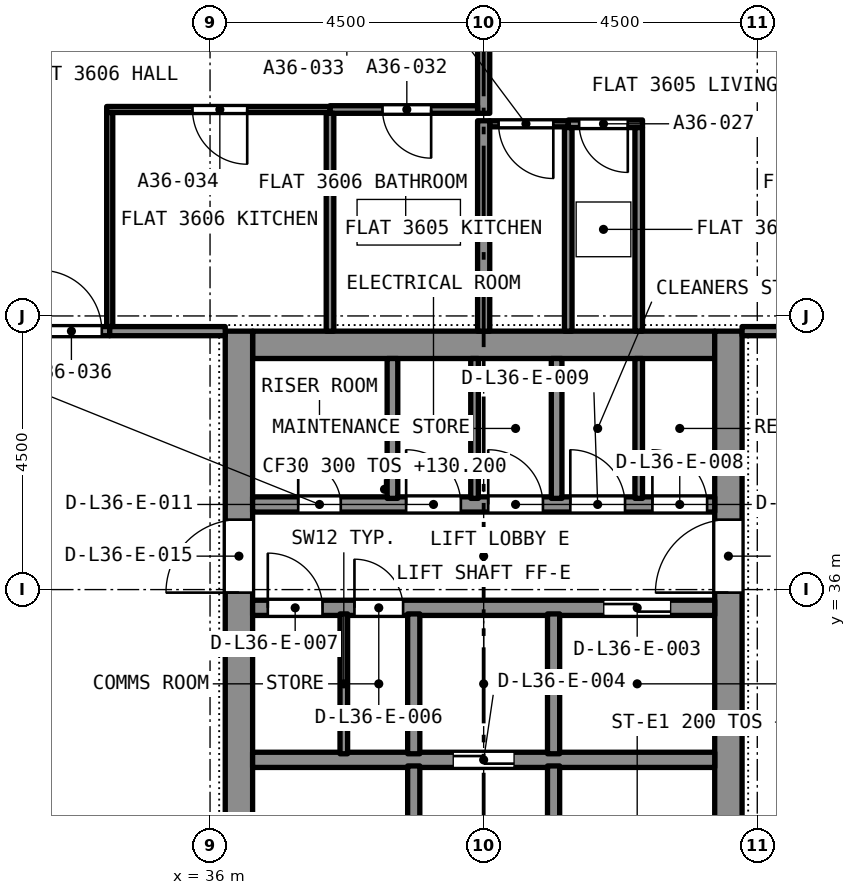
"""IFC4 building model, lengths in metres.
Left out: names, types, materials, properties, quantities, classifications, styles, units other than length and angle.
Written with IfcOpenShell. Run it as: python <this file> out.ifc"""

import sys

from ifc_helpers import new_model, si_unit, direction, frame, frame_2d, origin, place, context, subcontext, project, spatial, rectangle, extrude, element, fill, save


model = new_model("IFC4")
c1 = context("Model", 3, precision=1e-05, world=origin(), true_north=direction((0.0, 1.0)))
c2 = subcontext(c1, "Body", "Model", "MODEL_VIEW")
j1 = project(units=[si_unit("LENGTHUNIT", "METRE"), si_unit("PLANEANGLEUNIT", "RADIAN")], contexts=[c1])
p1 = place(None, origin())
s1 = spatial("IfcSite", under=j1, at=p1, CompositionType="ELEMENT")
p2 = place(p1, origin())
s2 = spatial("IfcBuilding", under=s1, at=p2, CompositionType="ELEMENT")
p3 = place(p2, frame((0.0, 0.0, 130.2)))
s3 = spatial("IfcBuildingStorey", under=s2, at=p3, CompositionType="ELEMENT", Elevation=130.2)
p4 = place(p3, frame((36.7, 40.025, 0.0), z_axis=(0.0, 0.0, 1.0), x_axis=(1.0, 0.0, 0.0)))
e1 = element("IfcWall", 1, at=p4, inside=s3, PredefinedType="SOLIDWALL", context=c2, shape_type="SweptSolid", body=[
    extrude(rectangle(XDim=7.6, YDim=0.45, at=frame_2d((3.8, 0.0))), origin(), (0.0, 0.0, 1.0), 3.2),
])
p5 = place(p3, frame((36.475, 27.25, 0.0), z_axis=(0.0, 0.0, 1.0), x_axis=(0.0, 1.0, 0.0)))
e2 = element("IfcWall", 2, at=p5, inside=s3, PredefinedType="SOLIDWALL", context=c2, shape_type="SweptSolid", body=[
    extrude(rectangle(XDim=13.0, YDim=0.45, at=frame_2d((6.5, 0.0))), origin(), (0.0, 0.0, 1.0), 3.2),
])
p6 = place(p5, frame((8.7, 0.0, 0.0)))
e3 = element("IfcOpeningElement", 3, at=p6, cuts=e2, PredefinedType="OPENING", context=c2, shape_type="SweptSolid", body=[
    extrude(rectangle(XDim=1.2, YDim=2.1, at=frame_2d((0.6, 1.05))), frame((0.0, 0.235, 0.0), z_axis=(0.0, -1.0, 0.0), x_axis=(1.0, 0.0, 0.0)), (0.0, 0.0, 1.0), 0.47),
])
p7 = place(p3, frame((44.525, 27.25, 0.0), z_axis=(0.0, 0.0, 1.0), x_axis=(0.0, 1.0, 0.0)))
e4 = element("IfcWall", 4, at=p7, inside=s3, PredefinedType="SOLIDWALL", context=c2, shape_type="SweptSolid", body=[
    extrude(rectangle(XDim=13.0, YDim=0.45, at=frame_2d((6.5, 0.0))), origin(), (0.0, 0.0, 1.0), 3.2),
])
p8 = place(p7, frame((8.7, 0.0, 0.0)))
e5 = element("IfcOpeningElement", 5, at=p8, cuts=e4, PredefinedType="OPENING", context=c2, shape_type="SweptSolid", body=[
    extrude(rectangle(XDim=1.2, YDim=2.1, at=frame_2d((0.6, 1.05))), frame((0.0, 0.235, 0.0), z_axis=(0.0, -1.0, 0.0), x_axis=(1.0, 0.0, 0.0)), (0.0, 0.0, 1.0), 0.47),
])
p9 = place(p3, frame((43.113, 43.66, 0.0), z_axis=(0.0, 0.0, 1.0), x_axis=(-1.0, 0.0, 0.0)))
e6 = element("IfcWall", 6, at=p9, inside=s3, PredefinedType="PARTITIONING", context=c2, shape_type="SweptSolid", body=[
    extrude(rectangle(XDim=1.222, YDim=0.125, at=frame_2d((0.611, 0.0))), origin(), (0.0, 0.0, 1.0), 2.9),
])
p10 = place(p9, frame((0.242, 0.0, 0.0)))
e7 = element("IfcOpeningElement", 7, at=p10, cuts=e6, PredefinedType="OPENING", context=c2, shape_type="SweptSolid", body=[
    extrude(rectangle(XDim=0.8, YDim=2.1, at=frame_2d((0.4, 1.05))), frame((0.0, 0.073, 0.0), z_axis=(0.0, -1.0, 0.0), x_axis=(1.0, 0.0, 0.0)), (0.0, 0.0, 1.0), 0.145),
])
for number, where, z_axis, x_axis in (
    (8, (43.05, 40.25, 0.0), (0.0, 0.0, 1.0), (0.0, 1.0, 0.0)),
    (9, (41.891, 40.25, 0.0), (0.0, 0.0, 1.0), (0.0, 1.0, 0.0)),
):
    element("IfcWall", number, at=place(p3, frame(where, z_axis=z_axis, x_axis=x_axis)), inside=s3, PredefinedType="PARTITIONING", context=c2, shape_type="SweptSolid", body=[
        extrude(rectangle(XDim=3.347, YDim=0.125, at=frame_2d((1.674, 0.0))), origin(), (0.0, 0.0, 1.0), 2.9),
    ])
p11 = place(p3, frame((41.891, 43.66, 0.0), z_axis=(0.0, 0.0, 1.0), x_axis=(-1.0, 0.0, 0.0)))
e10 = element("IfcWall", 10, at=p11, inside=s3, PredefinedType="PARTITIONING", context=c2, shape_type="SweptSolid", body=[
    extrude(rectangle(XDim=1.291, YDim=0.1, at=frame_2d((0.646, 0.0))), origin(), (0.0, 0.0, 1.0), 2.9),
])
p12 = place(p11, frame((0.246, 0.0, 0.0)))
e11 = element("IfcOpeningElement", 11, at=p12, cuts=e10, PredefinedType="OPENING", context=c2, shape_type="SweptSolid", body=[
    extrude(rectangle(XDim=0.9, YDim=2.1, at=frame_2d((0.45, 1.05))), frame((0.0, 0.06, 0.0), z_axis=(0.0, -1.0, 0.0), x_axis=(1.0, 0.0, 0.0)), (0.0, 0.0, 1.0), 0.12),
])
p13 = place(p3, frame((40.5, 43.833, 0.0), z_axis=(0.0, 0.0, 1.0), x_axis=(0.0, 1.0, 0.0)))
e12 = element("IfcWall", 12, at=p13, inside=s3, PredefinedType="PARTITIONING", context=c2, shape_type="SweptSolid", body=[
    extrude(rectangle(XDim=5.192, YDim=0.2, at=frame_2d((2.596, 0.0))), origin(), (0.0, 0.0, 1.0), 2.9),
])
p14 = place(p3, frame((44.75, 40.25, 0.0), z_axis=(0.0, 0.0, 1.0), x_axis=(1.0, 0.0, 0.0)))
e13 = element("IfcWall", 13, at=p14, inside=s3, PredefinedType="PARTITIONING", context=c2, shape_type="SweptSolid", body=[
    extrude(rectangle(XDim=4.275, YDim=0.15, at=frame_2d((2.137, 0.0))), origin(), (0.0, 0.0, 1.0), 2.9),
])
p15 = place(p14, frame((2.0, 0.0, 0.0)))
e14 = element("IfcOpeningElement", 14, at=p15, cuts=e13, PredefinedType="OPENING", context=c2, shape_type="SweptSolid", body=[
    extrude(rectangle(XDim=1.0, YDim=2.1, at=frame_2d((0.5, 1.05))), frame((0.0, 0.085, 0.0), z_axis=(0.0, -1.0, 0.0), x_axis=(1.0, 0.0, 0.0)), (0.0, 0.0, 1.0), 0.17),
])
p16 = place(p3, frame((40.5, 40.25, 0.0), z_axis=(0.0, 0.0, 1.0), x_axis=(0.0, 1.0, 0.0)))
e15 = element("IfcWall", 15, at=p16, inside=s3, PredefinedType="PARTITIONING", context=c2, shape_type="SweptSolid", body=[
    extrude(rectangle(XDim=3.46, YDim=0.2, at=frame_2d((1.73, 0.0))), origin(), (0.0, 0.0, 1.0), 2.9),
])
p17 = place(p3, frame((40.4, 43.895, 0.0), z_axis=(0.0, 0.0, 1.0), x_axis=(-1.0, 0.0, 0.0)))
e16 = element("IfcWall", 16, at=p17, inside=s3, PredefinedType="PARTITIONING", context=c2, shape_type="SweptSolid", body=[
    extrude(rectangle(XDim=2.427, YDim=0.125, at=frame_2d((1.214, 0.0))), origin(), (0.0, 0.0, 1.0), 2.9),
])
p18 = place(p17, frame((0.764, 0.0, 0.0)))
e17 = element("IfcOpeningElement", 17, at=p18, cuts=e16, PredefinedType="OPENING", context=c2, shape_type="SweptSolid", body=[
    extrude(rectangle(XDim=0.8, YDim=2.1, at=frame_2d((0.4, 1.05))), frame((0.0, 0.073, 0.0), z_axis=(0.0, -1.0, 0.0), x_axis=(1.0, 0.0, 0.0)), (0.0, 0.0, 1.0), 0.145),
])
p19 = place(p3, frame((37.973, 40.25, 0.0), z_axis=(0.0, 0.0, 1.0), x_axis=(0.0, 1.0, 0.0)))
e18 = element("IfcWall", 18, at=p19, inside=s3, PredefinedType="PARTITIONING", context=c2, shape_type="SweptSolid", body=[
    extrude(rectangle(XDim=3.583, YDim=0.125, at=frame_2d((1.791, 0.0))), origin(), (0.0, 0.0, 1.0), 2.9),
])
p20 = place(p3, frame((37.973, 43.895, 0.0), z_axis=(0.0, 0.0, 1.0), x_axis=(-1.0, 0.0, 0.0)))
e19 = element("IfcWall", 19, at=p20, inside=s3, PredefinedType="PARTITIONING", context=c2, shape_type="SweptSolid", body=[
    extrude(rectangle(XDim=3.673, YDim=0.1, at=frame_2d((1.836, 0.0))), origin(), (0.0, 0.0, 1.0), 2.9),
])
p21 = place(p20, frame((1.361, 0.0, 0.0)))
e20 = element("IfcOpeningElement", 20, at=p21, cuts=e19, PredefinedType="OPENING", context=c2, shape_type="SweptSolid", body=[
    extrude(rectangle(XDim=0.9, YDim=2.1, at=frame_2d((0.45, 1.05))), frame((0.0, 0.06, 0.0), z_axis=(0.0, -1.0, 0.0), x_axis=(1.0, 0.0, 0.0)), (0.0, 0.0, 1.0), 0.12),
])
p22 = place(p3, frame((34.35, 40.325, 0.0), z_axis=(0.0, 0.0, 1.0), x_axis=(0.0, 1.0, 0.0)))
e21 = element("IfcWall", 21, at=p22, inside=s3, PredefinedType="PARTITIONING", context=c2, shape_type="SweptSolid", body=[
    extrude(rectangle(XDim=3.52, YDim=0.1, at=frame_2d((1.76, 0.0))), origin(), (0.0, 0.0, 1.0), 2.9),
])
p23 = place(p3, frame((31.975, 40.25, 0.0), z_axis=(0.0, 0.0, 1.0), x_axis=(1.0, 0.0, 0.0)))
e22 = element("IfcWall", 22, at=p23, inside=s3, PredefinedType="PARTITIONING", context=c2, shape_type="SweptSolid", body=[
    extrude(rectangle(XDim=2.375, YDim=0.15, at=frame_2d((1.188, 0.0))), origin(), (0.0, 0.0, 1.0), 2.9),
])
p24 = place(p23, frame((1.245, 0.0, 0.0)))
e23 = element("IfcOpeningElement", 23, at=p24, cuts=e22, PredefinedType="OPENING", context=c2, shape_type="SweptSolid", body=[
    extrude(rectangle(XDim=1.0, YDim=2.1, at=frame_2d((0.5, 1.05))), frame((0.0, 0.085, 0.0), z_axis=(0.0, -1.0, 0.0), x_axis=(1.0, 0.0, 0.0)), (0.0, 0.0, 1.0), 0.17),
])
p25 = place(p3, frame((34.35, 40.25, 0.0), z_axis=(0.0, 0.0, 1.0), x_axis=(1.0, 0.0, 0.0)))
e24 = element("IfcWall", 24, at=p25, inside=s3, PredefinedType="PARTITIONING", context=c2, shape_type="SweptSolid", body=[
    extrude(rectangle(XDim=1.9, YDim=0.15, at=frame_2d((0.95, 0.0))), origin(), (0.0, 0.0, 1.0), 2.9),
])
p26 = place(p3, frame((36.7, 33.2, 0.0), z_axis=(0.0, 0.0, 1.0), x_axis=(1.0, 0.0, 0.0)))
e25 = element("IfcWall", 25, at=p26, inside=s3, PredefinedType="SOLIDWALL", context=c2, shape_type="SweptSolid", body=[
    extrude(rectangle(XDim=7.6, YDim=0.25, at=frame_2d((3.8, 0.0))), origin(), (0.0, 0.0, 1.0), 2.9),
])
p27 = place(p26, frame((3.3, 0.0, 0.0)))
e26 = element("IfcOpeningElement", 26, at=p27, cuts=e25, PredefinedType="OPENING", context=c2, shape_type="SweptSolid", body=[
    extrude(rectangle(XDim=1.0, YDim=2.1, at=frame_2d((0.5, 1.05))), frame((0.0, 0.135, 0.0), z_axis=(0.0, -1.0, 0.0), x_axis=(1.0, 0.0, 0.0)), (0.0, 0.0, 1.0), 0.27),
])
p28 = place(p3, frame((36.7, 35.7, 0.0), z_axis=(0.0, 0.0, 1.0), x_axis=(1.0, 0.0, 0.0)))
e27 = element("IfcWall", 27, at=p28, inside=s3, PredefinedType="SOLIDWALL", context=c2, shape_type="SweptSolid", body=[
    extrude(rectangle(XDim=7.6, YDim=0.25, at=frame_2d((3.8, 0.0))), origin(), (0.0, 0.0, 1.0), 2.9),
])
p29 = place(p28, frame((5.775, 0.0, 0.0)))
e28 = element("IfcOpeningElement", 28, at=p29, cuts=e27, PredefinedType="OPENING", context=c2, shape_type="SweptSolid", body=[
    extrude(rectangle(XDim=1.1, YDim=2.4, at=frame_2d((0.55, 1.2))), frame((0.0, 0.135, 0.0), z_axis=(0.0, -1.0, 0.0), x_axis=(1.0, 0.0, 0.0)), (0.0, 0.0, 1.0), 0.27),
])
p30 = place(p28, frame((1.675, 0.0, 0.0)))
e29 = element("IfcOpeningElement", 29, at=p30, cuts=e27, PredefinedType="OPENING", context=c2, shape_type="SweptSolid", body=[
    extrude(rectangle(XDim=0.8, YDim=2.1, at=frame_2d((0.4, 1.05))), frame((0.0, 0.135, 0.0), z_axis=(0.0, -1.0, 0.0), x_axis=(1.0, 0.0, 0.0)), (0.0, 0.0, 1.0), 0.27),
])
p31 = place(p28, frame((0.25, 0.0, 0.0)))
e30 = element("IfcOpeningElement", 30, at=p31, cuts=e27, PredefinedType="OPENING", context=c2, shape_type="SweptSolid", body=[
    extrude(rectangle(XDim=0.9, YDim=2.1, at=frame_2d((0.45, 1.05))), frame((0.0, 0.135, 0.0), z_axis=(0.0, -1.0, 0.0), x_axis=(1.0, 0.0, 0.0)), (0.0, 0.0, 1.0), 0.27),
])
p32 = place(p3, frame((36.7, 37.4, 0.0), z_axis=(0.0, 0.0, 1.0), x_axis=(1.0, 0.0, 0.0)))
e31 = element("IfcWall", 31, at=p32, inside=s3, PredefinedType="SOLIDWALL", context=c2, shape_type="SweptSolid", body=[
    extrude(rectangle(XDim=7.6, YDim=0.25, at=frame_2d((3.8, 0.0))), origin(), (0.0, 0.0, 1.0), 2.9),
])
p33 = place(p32, frame((0.75, 0.0, 0.0)))
e32 = element("IfcOpeningElement", 32, at=p33, cuts=e31, PredefinedType="OPENING", context=c2, shape_type="SweptSolid", body=[
    extrude(rectangle(XDim=0.7, YDim=2.1, at=frame_2d((0.35, 1.05))), frame((0.0, 0.135, 0.0), z_axis=(0.0, -1.0, 0.0), x_axis=(1.0, 0.0, 0.0)), (0.0, 0.0, 1.0), 0.27),
])
p34 = place(p32, frame((6.575, 0.0, 0.0)))
e33 = element("IfcOpeningElement", 33, at=p34, cuts=e31, PredefinedType="OPENING", context=c2, shape_type="SweptSolid", body=[
    extrude(rectangle(XDim=0.9, YDim=2.1, at=frame_2d((0.45, 1.05))), frame((0.0, 0.135, 0.0), z_axis=(0.0, -1.0, 0.0), x_axis=(1.0, 0.0, 0.0)), (0.0, 0.0, 1.0), 0.27),
])
p35 = place(p32, frame((5.225, 0.0, 0.0)))
e34 = element("IfcOpeningElement", 34, at=p35, cuts=e31, PredefinedType="OPENING", context=c2, shape_type="SweptSolid", body=[
    extrude(rectangle(XDim=0.9, YDim=2.1, at=frame_2d((0.45, 1.05))), frame((0.0, 0.135, 0.0), z_axis=(0.0, -1.0, 0.0), x_axis=(1.0, 0.0, 0.0)), (0.0, 0.0, 1.0), 0.27),
])
p36 = place(p32, frame((3.875, 0.0, 0.0)))
e35 = element("IfcOpeningElement", 35, at=p36, cuts=e31, PredefinedType="OPENING", context=c2, shape_type="SweptSolid", body=[
    extrude(rectangle(XDim=0.9, YDim=2.1, at=frame_2d((0.45, 1.05))), frame((0.0, 0.135, 0.0), z_axis=(0.0, -1.0, 0.0), x_axis=(1.0, 0.0, 0.0)), (0.0, 0.0, 1.0), 0.27),
])
p37 = place(p32, frame((2.525, 0.0, 0.0)))
e36 = element("IfcOpeningElement", 36, at=p37, cuts=e31, PredefinedType="OPENING", context=c2, shape_type="SweptSolid", body=[
    extrude(rectangle(XDim=0.9, YDim=2.1, at=frame_2d((0.45, 1.05))), frame((0.0, 0.135, 0.0), z_axis=(0.0, -1.0, 0.0), x_axis=(1.0, 0.0, 0.0)), (0.0, 0.0, 1.0), 0.27),
])
p38 = place(p3, frame((41.65, 27.7, 0.0), z_axis=(0.0, 0.0, 1.0), x_axis=(0.0, 1.0, 0.0)))
e37 = element("IfcWall", 37, at=p38, inside=s3, PredefinedType="SOLIDWALL", context=c2, shape_type="SweptSolid", body=[
    extrude(rectangle(XDim=5.4, YDim=0.2, at=frame_2d((2.7, 0.0))), origin(), (0.0, 0.0, 1.0), 2.9),
])
p39 = place(p38, frame((0.2, 0.0, 0.0)))
e38 = element("IfcOpeningElement", 38, at=p39, cuts=e37, PredefinedType="OPENING", context=c2, shape_type="SweptSolid", body=[
    extrude(rectangle(XDim=0.9, YDim=2.1, at=frame_2d((0.45, 1.05))), frame((0.0, 0.11, 0.0), z_axis=(0.0, -1.0, 0.0), x_axis=(1.0, 0.0, 0.0)), (0.0, 0.0, 1.0), 0.22),
])
p40 = place(p3, frame((39.35, 27.7, 0.0), z_axis=(0.0, 0.0, 1.0), x_axis=(0.0, 1.0, 0.0)))
e39 = element("IfcWall", 39, at=p40, inside=s3, PredefinedType="SOLIDWALL", context=c2, shape_type="SweptSolid", body=[
    extrude(rectangle(XDim=5.4, YDim=0.2, at=frame_2d((2.7, 0.0))), origin(), (0.0, 0.0, 1.0), 2.9),
])
p41 = place(p40, frame((0.2, 0.0, 0.0)))
e40 = element("IfcOpeningElement", 40, at=p41, cuts=e39, PredefinedType="OPENING", context=c2, shape_type="SweptSolid", body=[
    extrude(rectangle(XDim=0.9, YDim=2.1, at=frame_2d((0.45, 1.05))), frame((0.0, 0.11, 0.0), z_axis=(0.0, -1.0, 0.0), x_axis=(1.0, 0.0, 0.0)), (0.0, 0.0, 1.0), 0.22),
])
for number, where, z_axis, x_axis in (
    (41, (41.65, 33.3, 0.0), (0.0, 0.0, 1.0), (0.0, 1.0, 0.0)),
    (42, (39.35, 33.3, 0.0), (0.0, 0.0, 1.0), (0.0, 1.0, 0.0)),
):
    element("IfcWall", number, at=place(p3, frame(where, z_axis=z_axis, x_axis=x_axis)), inside=s3, PredefinedType="SOLIDWALL", context=c2, shape_type="SweptSolid", body=[
        extrude(rectangle(XDim=2.3, YDim=0.2, at=frame_2d((1.15, 0.0))), origin(), (0.0, 0.0, 1.0), 2.9),
    ])
for number, where, z_axis, x_axis in (
    (43, (41.7, 37.5, 0.0), (0.0, 0.0, 1.0), (0.0, 1.0, 0.0)),
    (44, (39.0, 37.5, 0.0), (0.0, 0.0, 1.0), (0.0, 1.0, 0.0)),
):
    element("IfcWall", number, at=place(p3, frame(where, z_axis=z_axis, x_axis=x_axis)), inside=s3, PredefinedType="SOLIDWALL", context=c2, shape_type="SweptSolid", body=[
        extrude(rectangle(XDim=2.3, YDim=0.175, at=frame_2d((1.15, 0.0))), origin(), (0.0, 0.0, 1.0), 2.9),
    ])
for number, where, z_axis, x_axis in (
    (45, (38.2, 33.3, 0.0), (0.0, 0.0, 1.0), (0.0, 1.0, 0.0)),
    (46, (43.05, 37.5, 0.0), (0.0, 0.0, 1.0), (0.0, 1.0, 0.0)),
    (47, (40.35, 37.5, 0.0), (0.0, 0.0, 1.0), (0.0, 1.0, 0.0)),
):
    element("IfcWall", number, at=place(p3, frame(where, z_axis=z_axis, x_axis=x_axis)), inside=s3, PredefinedType="PARTITIONING", context=c2, shape_type="SweptSolid", body=[
        extrude(rectangle(XDim=2.3, YDim=0.125, at=frame_2d((1.15, 0.0))), origin(), (0.0, 0.0, 1.0), 2.9),
    ])
p42 = place(p10, origin())
e48 = element("IfcDoor", 48, at=p42, inside=s3, OperationType="SINGLE_SWING_RIGHT", PredefinedType="DOOR", context=c2, shape_type="SweptSolid", body=[
    extrude(rectangle(XDim=0.8, YDim=2.1, at=frame_2d((0.4, 1.05))), frame((0.0, 0.025, 0.0), z_axis=(0.0, -1.0, 0.0), x_axis=(1.0, 0.0, 0.0)), (0.0, 0.0, 1.0), 0.05),
])
fill(e7, e48)
p43 = place(p12, origin())
e49 = element("IfcDoor", 49, at=p43, inside=s3, OperationType="SINGLE_SWING_RIGHT", PredefinedType="DOOR", context=c2, shape_type="SweptSolid", body=[
    extrude(rectangle(XDim=0.9, YDim=2.1, at=frame_2d((0.45, 1.05))), frame((0.0, 0.025, 0.0), z_axis=(0.0, -1.0, 0.0), x_axis=(1.0, 0.0, 0.0)), (0.0, 0.0, 1.0), 0.05),
])
fill(e11, e49)
p44 = place(p18, origin())
e50 = element("IfcDoor", 50, at=p44, inside=s3, OperationType="SINGLE_SWING_LEFT", PredefinedType="DOOR", context=c2, shape_type="SweptSolid", body=[
    extrude(rectangle(XDim=0.8, YDim=2.1, at=frame_2d((0.4, 1.05))), frame((0.0, 0.025, 0.0), z_axis=(0.0, -1.0, 0.0), x_axis=(1.0, 0.0, 0.0)), (0.0, 0.0, 1.0), 0.05),
])
fill(e17, e50)
p45 = place(p21, origin())
e51 = element("IfcDoor", 51, at=p45, inside=s3, OperationType="SINGLE_SWING_LEFT", PredefinedType="DOOR", context=c2, shape_type="SweptSolid", body=[
    extrude(rectangle(XDim=0.9, YDim=2.1, at=frame_2d((0.45, 1.05))), frame((0.0, 0.025, 0.0), z_axis=(0.0, -1.0, 0.0), x_axis=(1.0, 0.0, 0.0)), (0.0, 0.0, 1.0), 0.05),
])
fill(e20, e51)
p46 = place(p24, origin())
e52 = element("IfcDoor", 52, at=p46, inside=s3, OperationType="SINGLE_SWING_RIGHT", PredefinedType="DOOR", context=c2, shape_type="SweptSolid", body=[
    extrude(rectangle(XDim=1.0, YDim=2.1, at=frame_2d((0.5, 1.05))), frame((0.0, 0.025, 0.0), z_axis=(0.0, -1.0, 0.0), x_axis=(1.0, 0.0, 0.0)), (0.0, 0.0, 1.0), 0.05),
])
fill(e23, e52)
p47 = place(p29, origin())
e53 = element("IfcDoor", 53, at=p47, inside=s3, OperationType="SLIDING_TO_LEFT", PredefinedType="DOOR", context=c2, shape_type="SweptSolid", body=[
    extrude(rectangle(XDim=1.1, YDim=2.4, at=frame_2d((0.55, 1.2))), frame((0.0, 0.025, 0.0), z_axis=(0.0, -1.0, 0.0), x_axis=(1.0, 0.0, 0.0)), (0.0, 0.0, 1.0), 0.05),
])
fill(e28, e53)
p48 = place(p27, origin())
e54 = element("IfcDoor", 54, at=p48, inside=s3, OperationType="SLIDING_TO_LEFT", PredefinedType="DOOR", context=c2, shape_type="SweptSolid", body=[
    extrude(rectangle(XDim=1.0, YDim=2.1, at=frame_2d((0.5, 1.05))), frame((0.0, 0.025, 0.0), z_axis=(0.0, -1.0, 0.0), x_axis=(1.0, 0.0, 0.0)), (0.0, 0.0, 1.0), 0.05),
])
fill(e26, e54)
p49 = place(p33, origin())
e55 = element("IfcDoor", 55, at=p49, inside=s3, OperationType="SINGLE_SWING_LEFT", PredefinedType="DOOR", context=c2, shape_type="SweptSolid", body=[
    extrude(rectangle(XDim=0.7, YDim=2.1, at=frame_2d((0.35, 1.05))), frame((0.0, 0.025, 0.0), z_axis=(0.0, -1.0, 0.0), x_axis=(1.0, 0.0, 0.0)), (0.0, 0.0, 1.0), 0.05),
])
fill(e32, e55)
p50 = place(p30, origin())
e56 = element("IfcDoor", 56, at=p50, inside=s3, OperationType="SINGLE_SWING_LEFT", PredefinedType="DOOR", context=c2, shape_type="SweptSolid", body=[
    extrude(rectangle(XDim=0.8, YDim=2.1, at=frame_2d((0.4, 1.05))), frame((0.0, 0.025, 0.0), z_axis=(0.0, -1.0, 0.0), x_axis=(1.0, 0.0, 0.0)), (0.0, 0.0, 1.0), 0.05),
])
fill(e29, e56)
p51 = place(p31, origin())
e57 = element("IfcDoor", 57, at=p51, inside=s3, OperationType="SINGLE_SWING_LEFT", PredefinedType="DOOR", context=c2, shape_type="SweptSolid", body=[
    extrude(rectangle(XDim=0.9, YDim=2.1, at=frame_2d((0.45, 1.05))), frame((0.0, 0.025, 0.0), z_axis=(0.0, -1.0, 0.0), x_axis=(1.0, 0.0, 0.0)), (0.0, 0.0, 1.0), 0.05),
])
fill(e30, e57)
p52 = place(p34, origin())
e58 = element("IfcDoor", 58, at=p52, inside=s3, OperationType="SINGLE_SWING_LEFT", PredefinedType="DOOR", context=c2, shape_type="SweptSolid", body=[
    extrude(rectangle(XDim=0.9, YDim=2.1, at=frame_2d((0.45, 1.05))), frame((0.0, 0.025, 0.0), z_axis=(0.0, -1.0, 0.0), x_axis=(1.0, 0.0, 0.0)), (0.0, 0.0, 1.0), 0.05),
])
fill(e33, e58)
p53 = place(p35, origin())
e59 = element("IfcDoor", 59, at=p53, inside=s3, OperationType="SINGLE_SWING_LEFT", PredefinedType="DOOR", context=c2, shape_type="SweptSolid", body=[
    extrude(rectangle(XDim=0.9, YDim=2.1, at=frame_2d((0.45, 1.05))), frame((0.0, 0.025, 0.0), z_axis=(0.0, -1.0, 0.0), x_axis=(1.0, 0.0, 0.0)), (0.0, 0.0, 1.0), 0.05),
])
fill(e34, e59)
p54 = place(p36, origin())
e60 = element("IfcDoor", 60, at=p54, inside=s3, OperationType="SINGLE_SWING_LEFT", PredefinedType="DOOR", context=c2, shape_type="SweptSolid", body=[
    extrude(rectangle(XDim=0.9, YDim=2.1, at=frame_2d((0.45, 1.05))), frame((0.0, 0.025, 0.0), z_axis=(0.0, -1.0, 0.0), x_axis=(1.0, 0.0, 0.0)), (0.0, 0.0, 1.0), 0.05),
])
fill(e35, e60)
p55 = place(p37, origin())
e61 = element("IfcDoor", 61, at=p55, inside=s3, OperationType="SINGLE_SWING_LEFT", PredefinedType="DOOR", context=c2, shape_type="SweptSolid", body=[
    extrude(rectangle(XDim=0.9, YDim=2.1, at=frame_2d((0.45, 1.05))), frame((0.0, 0.025, 0.0), z_axis=(0.0, -1.0, 0.0), x_axis=(1.0, 0.0, 0.0)), (0.0, 0.0, 1.0), 0.05),
])
fill(e36, e61)
p56 = place(p6, origin())
e62 = element("IfcDoor", 62, at=p56, inside=s3, OperationType="SINGLE_SWING_LEFT", PredefinedType="DOOR", context=c2, shape_type="SweptSolid", body=[
    extrude(rectangle(XDim=1.2, YDim=2.1, at=frame_2d((0.6, 1.05))), frame((0.0, 0.025, 0.0), z_axis=(0.0, -1.0, 0.0), x_axis=(1.0, 0.0, 0.0)), (0.0, 0.0, 1.0), 0.05),
])
fill(e3, e62)
p57 = place(p8, origin())
e63 = element("IfcDoor", 63, at=p57, inside=s3, OperationType="SINGLE_SWING_LEFT", PredefinedType="DOOR", context=c2, shape_type="SweptSolid", body=[
    extrude(rectangle(XDim=1.2, YDim=2.1, at=frame_2d((0.6, 1.05))), frame((0.0, 0.025, 0.0), z_axis=(0.0, -1.0, 0.0), x_axis=(1.0, 0.0, 0.0)), (0.0, 0.0, 1.0), 0.05),
])
fill(e5, e63)
save(model, sys.argv[1])
